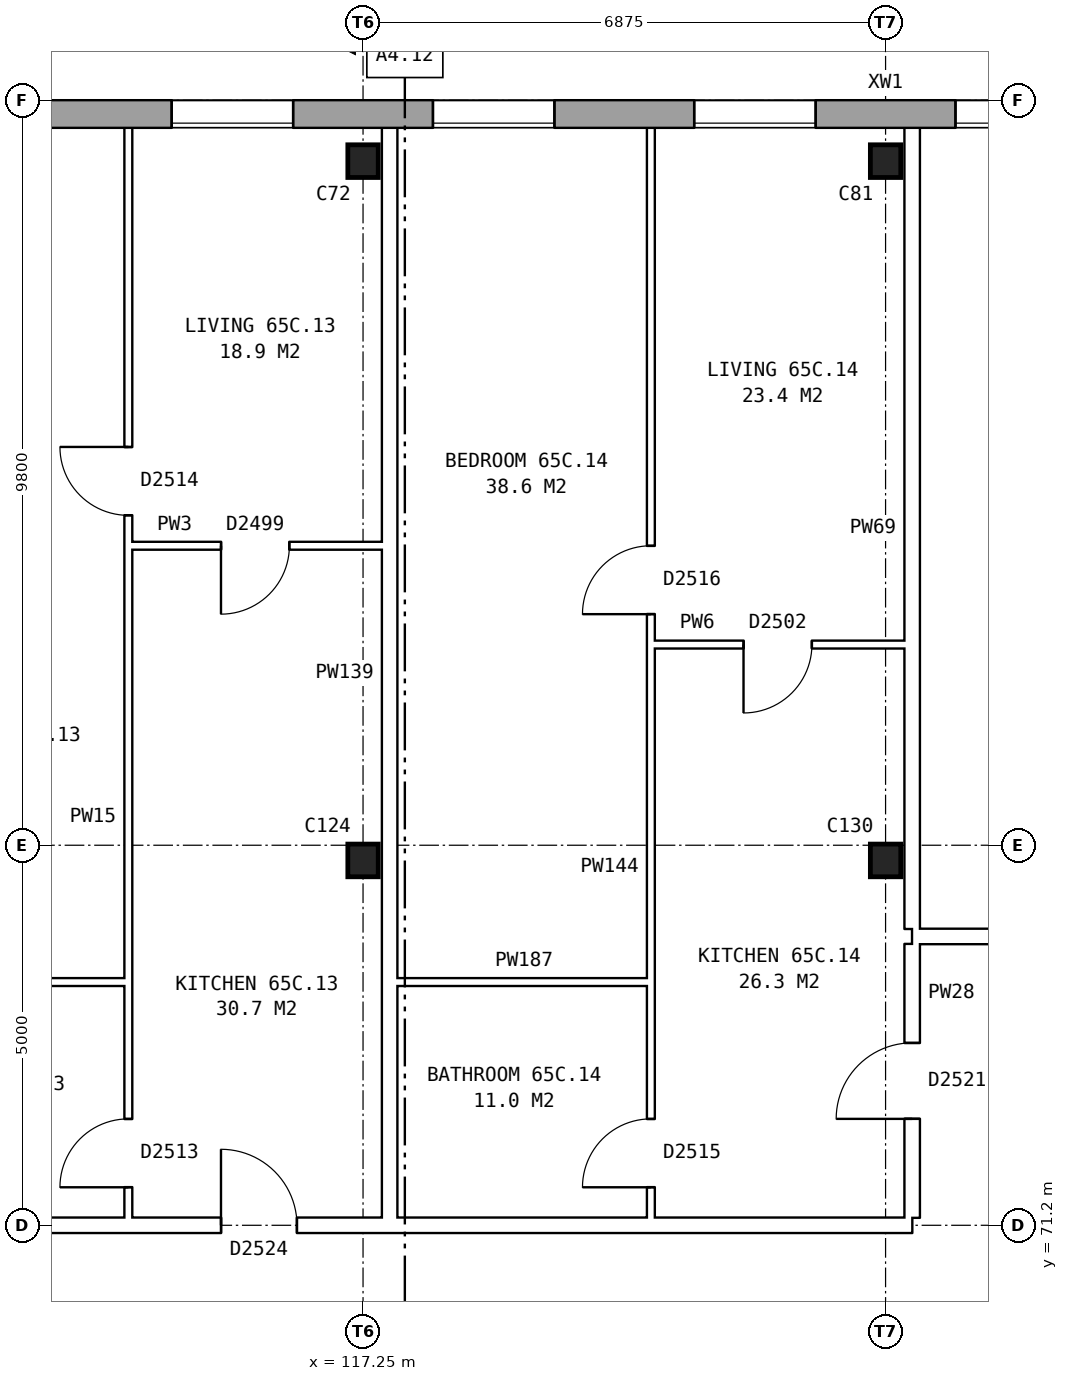
"""IFC4 building model, lengths in metres.
Left out: names, types, materials, properties, quantities, classifications, styles, units other than length and angle.
Written with IfcOpenShell. Run it as: python <this file> out.ifc"""

import sys

from ifc_helpers import new_model, si_unit, direction, frame, frame_2d, origin, origin_2d, place, context, subcontext, project, spatial, rectangle, i_section, extrude, element, fill, save


model = new_model("IFC4")
c1 = context("Model", 3, precision=1e-05, world=origin(), true_north=direction((0.0, 1.0)))
c2 = subcontext(c1, "Body", "Model", "MODEL_VIEW")
j1 = project(units=[si_unit("LENGTHUNIT", "METRE"), si_unit("PLANEANGLEUNIT", "RADIAN")], contexts=[c1])
p1 = place(None, origin())
s1 = spatial("IfcSite", under=j1, at=p1, CompositionType="ELEMENT")
p2 = place(p1, origin())
s2 = spatial("IfcBuilding", under=s1, at=p2, CompositionType="ELEMENT")
p3 = place(p2, frame((0.0, 0.0, 230.7)))
s3 = spatial("IfcBuildingStorey", under=s2, at=p3, CompositionType="ELEMENT", Elevation=230.7)
for number, where, z_axis, x_axis in (
    (1, (117.25, 76.0, 0.0), (0.0, 0.0, 1.0), (1.0, 0.0, 0.0)),
    (2, (124.125, 76.0, 0.0), (0.0, 0.0, 1.0), (1.0, 0.0, 0.0)),
    (3, (117.25, 85.2, 0.0), (0.0, 0.0, 1.0), (1.0, 0.0, 0.0)),
    (4, (124.125, 85.2, 0.0), (0.0, 0.0, 1.0), (1.0, 0.0, 0.0)),
):
    element("IfcColumn", number, at=place(p3, frame(where, z_axis=z_axis, x_axis=x_axis)), inside=s3, PredefinedType="COLUMN", context=c2, shape_type="SweptSolid", body=[
        extrude(i_section(OverallWidth=0.4, OverallDepth=0.43, WebThickness=0.028, FlangeThickness=0.04, at=origin_2d()), origin(), (0.0, 0.0, 1.0), 2.85),
    ])
p4 = place(p3, frame((131.05, 85.82, 0.0), z_axis=(0.0, 0.0, 1.0), x_axis=(-1.0, 0.0, 0.0)))
e5 = element("IfcWall", 5, at=p4, inside=s3, PredefinedType="STANDARD", context=c2, shape_type="SweptSolid", body=[
    extrude(rectangle(XDim=55.1, YDim=0.36, at=frame_2d((27.55, 0.0))), origin(), (0.0, 0.0, 1.0), 2.85),
])
p5 = place(p4, frame((0.969, 0.0, 0.8)))
e6 = element("IfcOpeningElement", 6, at=p5, cuts=e5, PredefinedType="OPENING", context=c2, shape_type="SweptSolid", body=[
    extrude(rectangle(XDim=1.6, YDim=1.8, at=frame_2d((0.8, 0.9))), frame((0.0, 0.19, 0.0), z_axis=(0.0, -1.0, 0.0), x_axis=(1.0, 0.0, 0.0)), (0.0, 0.0, 1.0), 0.38),
])
p6 = place(p4, frame((4.406, 0.0, 0.8)))
e7 = element("IfcOpeningElement", 7, at=p6, cuts=e5, PredefinedType="OPENING", context=c2, shape_type="SweptSolid", body=[
    extrude(rectangle(XDim=1.6, YDim=1.8, at=frame_2d((0.8, 0.9))), frame((0.0, 0.19, 0.0), z_axis=(0.0, -1.0, 0.0), x_axis=(1.0, 0.0, 0.0)), (0.0, 0.0, 1.0), 0.38),
])
p7 = place(p4, frame((7.844, 0.0, 0.8)))
e8 = element("IfcOpeningElement", 8, at=p7, cuts=e5, PredefinedType="OPENING", context=c2, shape_type="SweptSolid", body=[
    extrude(rectangle(XDim=1.6, YDim=1.8, at=frame_2d((0.8, 0.9))), frame((0.0, 0.19, 0.0), z_axis=(0.0, -1.0, 0.0), x_axis=(1.0, 0.0, 0.0)), (0.0, 0.0, 1.0), 0.38),
])
p8 = place(p4, frame((11.281, 0.0, 0.8)))
e9 = element("IfcOpeningElement", 9, at=p8, cuts=e5, PredefinedType="OPENING", context=c2, shape_type="SweptSolid", body=[
    extrude(rectangle(XDim=1.6, YDim=1.8, at=frame_2d((0.8, 0.9))), frame((0.0, 0.19, 0.0), z_axis=(0.0, -1.0, 0.0), x_axis=(1.0, 0.0, 0.0)), (0.0, 0.0, 1.0), 0.38),
])
p9 = place(p4, frame((14.719, 0.0, 0.8)))
e10 = element("IfcOpeningElement", 10, at=p9, cuts=e5, PredefinedType="OPENING", context=c2, shape_type="SweptSolid", body=[
    extrude(rectangle(XDim=1.6, YDim=1.8, at=frame_2d((0.8, 0.9))), frame((0.0, 0.19, 0.0), z_axis=(0.0, -1.0, 0.0), x_axis=(1.0, 0.0, 0.0)), (0.0, 0.0, 1.0), 0.38),
])
p10 = place(p4, frame((18.156, 0.0, 0.8)))
e11 = element("IfcOpeningElement", 11, at=p10, cuts=e5, PredefinedType="OPENING", context=c2, shape_type="SweptSolid", body=[
    extrude(rectangle(XDim=1.6, YDim=1.8, at=frame_2d((0.8, 0.9))), frame((0.0, 0.19, 0.0), z_axis=(0.0, -1.0, 0.0), x_axis=(1.0, 0.0, 0.0)), (0.0, 0.0, 1.0), 0.38),
])
p11 = place(p4, frame((21.594, 0.0, 0.8)))
e12 = element("IfcOpeningElement", 12, at=p11, cuts=e5, PredefinedType="OPENING", context=c2, shape_type="SweptSolid", body=[
    extrude(rectangle(XDim=1.6, YDim=1.8, at=frame_2d((0.8, 0.9))), frame((0.0, 0.19, 0.0), z_axis=(0.0, -1.0, 0.0), x_axis=(1.0, 0.0, 0.0)), (0.0, 0.0, 1.0), 0.38),
])
p12 = place(p4, frame((25.031, 0.0, 0.8)))
e13 = element("IfcOpeningElement", 13, at=p12, cuts=e5, PredefinedType="OPENING", context=c2, shape_type="SweptSolid", body=[
    extrude(rectangle(XDim=1.6, YDim=1.8, at=frame_2d((0.8, 0.9))), frame((0.0, 0.19, 0.0), z_axis=(0.0, -1.0, 0.0), x_axis=(1.0, 0.0, 0.0)), (0.0, 0.0, 1.0), 0.38),
])
p13 = place(p4, frame((28.469, 0.0, 0.8)))
e14 = element("IfcOpeningElement", 14, at=p13, cuts=e5, PredefinedType="OPENING", context=c2, shape_type="SweptSolid", body=[
    extrude(rectangle(XDim=1.6, YDim=1.8, at=frame_2d((0.8, 0.9))), frame((0.0, 0.19, 0.0), z_axis=(0.0, -1.0, 0.0), x_axis=(1.0, 0.0, 0.0)), (0.0, 0.0, 1.0), 0.38),
])
p14 = place(p4, frame((31.906, 0.0, 0.8)))
e15 = element("IfcOpeningElement", 15, at=p14, cuts=e5, PredefinedType="OPENING", context=c2, shape_type="SweptSolid", body=[
    extrude(rectangle(XDim=1.6, YDim=1.8, at=frame_2d((0.8, 0.9))), frame((0.0, 0.19, 0.0), z_axis=(0.0, -1.0, 0.0), x_axis=(1.0, 0.0, 0.0)), (0.0, 0.0, 1.0), 0.38),
])
p15 = place(p4, frame((35.344, 0.0, 0.8)))
e16 = element("IfcOpeningElement", 16, at=p15, cuts=e5, PredefinedType="OPENING", context=c2, shape_type="SweptSolid", body=[
    extrude(rectangle(XDim=1.6, YDim=1.8, at=frame_2d((0.8, 0.9))), frame((0.0, 0.19, 0.0), z_axis=(0.0, -1.0, 0.0), x_axis=(1.0, 0.0, 0.0)), (0.0, 0.0, 1.0), 0.38),
])
p16 = place(p4, frame((38.781, 0.0, 0.8)))
e17 = element("IfcOpeningElement", 17, at=p16, cuts=e5, PredefinedType="OPENING", context=c2, shape_type="SweptSolid", body=[
    extrude(rectangle(XDim=1.6, YDim=1.8, at=frame_2d((0.8, 0.9))), frame((0.0, 0.19, 0.0), z_axis=(0.0, -1.0, 0.0), x_axis=(1.0, 0.0, 0.0)), (0.0, 0.0, 1.0), 0.38),
])
p17 = place(p4, frame((42.219, 0.0, 0.8)))
e18 = element("IfcOpeningElement", 18, at=p17, cuts=e5, PredefinedType="OPENING", context=c2, shape_type="SweptSolid", body=[
    extrude(rectangle(XDim=1.6, YDim=1.8, at=frame_2d((0.8, 0.9))), frame((0.0, 0.19, 0.0), z_axis=(0.0, -1.0, 0.0), x_axis=(1.0, 0.0, 0.0)), (0.0, 0.0, 1.0), 0.38),
])
p18 = place(p4, frame((45.656, 0.0, 0.8)))
e19 = element("IfcOpeningElement", 19, at=p18, cuts=e5, PredefinedType="OPENING", context=c2, shape_type="SweptSolid", body=[
    extrude(rectangle(XDim=1.6, YDim=1.8, at=frame_2d((0.8, 0.9))), frame((0.0, 0.19, 0.0), z_axis=(0.0, -1.0, 0.0), x_axis=(1.0, 0.0, 0.0)), (0.0, 0.0, 1.0), 0.38),
])
p19 = place(p4, frame((49.094, 0.0, 0.8)))
e20 = element("IfcOpeningElement", 20, at=p19, cuts=e5, PredefinedType="OPENING", context=c2, shape_type="SweptSolid", body=[
    extrude(rectangle(XDim=1.6, YDim=1.8, at=frame_2d((0.8, 0.9))), frame((0.0, 0.19, 0.0), z_axis=(0.0, -1.0, 0.0), x_axis=(1.0, 0.0, 0.0)), (0.0, 0.0, 1.0), 0.38),
])
p20 = place(p4, frame((52.531, 0.0, 0.8)))
e21 = element("IfcOpeningElement", 21, at=p20, cuts=e5, PredefinedType="OPENING", context=c2, shape_type="SweptSolid", body=[
    extrude(rectangle(XDim=1.6, YDim=1.8, at=frame_2d((0.8, 0.9))), frame((0.0, 0.19, 0.0), z_axis=(0.0, -1.0, 0.0), x_axis=(1.0, 0.0, 0.0)), (0.0, 0.0, 1.0), 0.38),
])
p21 = place(p3, frame((83.225, 71.2, 0.0), z_axis=(0.0, 0.0, 1.0), x_axis=(1.0, 0.0, 0.0)))
e22 = element("IfcWall", 22, at=p21, inside=s3, PredefinedType="PARTITIONING", context=c2, shape_type="SweptSolid", body=[
    extrude(rectangle(XDim=41.25, YDim=0.2, at=frame_2d((20.625, 0.0))), origin(), (0.0, 0.0, 1.0), 2.85),
])
p22 = place(p21, frame((11.531, 0.0, 0.0)))
e23 = element("IfcOpeningElement", 23, at=p22, cuts=e22, PredefinedType="OPENING", context=c2, shape_type="SweptSolid", body=[
    extrude(rectangle(XDim=1.0, YDim=2.1, at=frame_2d((0.5, 1.05))), frame((0.0, 0.11, 0.0), z_axis=(0.0, -1.0, 0.0), x_axis=(1.0, 0.0, 0.0)), (0.0, 0.0, 1.0), 0.22),
])
p23 = place(p21, frame((21.844, 0.0, 0.0)))
e24 = element("IfcOpeningElement", 24, at=p23, cuts=e22, PredefinedType="OPENING", context=c2, shape_type="SweptSolid", body=[
    extrude(rectangle(XDim=1.0, YDim=2.1, at=frame_2d((0.5, 1.05))), frame((0.0, 0.11, 0.0), z_axis=(0.0, -1.0, 0.0), x_axis=(1.0, 0.0, 0.0)), (0.0, 0.0, 1.0), 0.22),
])
p24 = place(p21, frame((32.156, 0.0, 0.0)))
e25 = element("IfcOpeningElement", 25, at=p24, cuts=e22, PredefinedType="OPENING", context=c2, shape_type="SweptSolid", body=[
    extrude(rectangle(XDim=1.0, YDim=2.1, at=frame_2d((0.5, 1.05))), frame((0.0, 0.11, 0.0), z_axis=(0.0, -1.0, 0.0), x_axis=(1.0, 0.0, 0.0)), (0.0, 0.0, 1.0), 0.22),
])
p25 = place(p3, frame((107.287, 74.4, 0.0), z_axis=(0.0, 0.0, 1.0), x_axis=(1.0, 0.0, 0.0)))
e26 = element("IfcWall", 26, at=p25, inside=s3, PredefinedType="PARTITIONING", context=c2, shape_type="SweptSolid", body=[
    extrude(rectangle(XDim=6.875, YDim=0.1, at=frame_2d((3.438, 0.0))), origin(), (0.0, 0.0, 1.0), 2.85),
])
p26 = place(p3, frame((117.7, 74.4, 0.0), z_axis=(0.0, 0.0, 1.0), x_axis=(1.0, 0.0, 0.0)))
e27 = element("IfcWall", 27, at=p26, inside=s3, PredefinedType="PARTITIONING", context=c2, shape_type="SweptSolid", body=[
    extrude(rectangle(XDim=3.337, YDim=0.1, at=frame_2d((1.668, 0.0))), origin(), (0.0, 0.0, 1.0), 2.85),
])
p27 = place(p3, frame((124.475, 75.0, 0.0), z_axis=(0.0, 0.0, 1.0), x_axis=(1.0, 0.0, 0.0)))
e28 = element("IfcWall", 28, at=p27, inside=s3, PredefinedType="PARTITIONING", context=c2, shape_type="SweptSolid", body=[
    extrude(rectangle(XDim=6.885, YDim=0.2, at=frame_2d((3.442, 0.0))), origin(), (0.0, 0.0, 1.0), 2.85),
])
p28 = place(p27, frame((2.992, 0.0, 0.0)))
e29 = element("IfcOpeningElement", 29, at=p28, cuts=e28, PredefinedType="OPENING", context=c2, shape_type="SweptSolid", body=[
    extrude(rectangle(XDim=0.9, YDim=2.1, at=frame_2d((0.45, 1.05))), frame((0.0, 0.11, 0.0), z_axis=(0.0, -1.0, 0.0), x_axis=(1.0, 0.0, 0.0)), (0.0, 0.0, 1.0), 0.22),
])
p29 = place(p3, frame((121.037, 78.84, 0.0), z_axis=(0.0, 0.0, 1.0), x_axis=(1.0, 0.0, 0.0)))
e30 = element("IfcWall", 30, at=p29, inside=s3, PredefinedType="PARTITIONING", context=c2, shape_type="SweptSolid", body=[
    extrude(rectangle(XDim=3.338, YDim=0.1, at=frame_2d((1.669, 0.0))), origin(), (0.0, 0.0, 1.0), 2.85),
])
p30 = place(p29, frame((1.219, 0.0, 0.0)))
e31 = element("IfcOpeningElement", 31, at=p30, cuts=e30, PredefinedType="OPENING", context=c2, shape_type="SweptSolid", body=[
    extrude(rectangle(XDim=0.9, YDim=2.1, at=frame_2d((0.45, 1.05))), frame((0.0, 0.06, 0.0), z_axis=(0.0, -1.0, 0.0), x_axis=(1.0, 0.0, 0.0)), (0.0, 0.0, 1.0), 0.12),
])
p31 = place(p3, frame((114.162, 80.14, 0.0), z_axis=(0.0, 0.0, 1.0), x_axis=(1.0, 0.0, 0.0)))
e32 = element("IfcWall", 32, at=p31, inside=s3, PredefinedType="PARTITIONING", context=c2, shape_type="SweptSolid", body=[
    extrude(rectangle(XDim=3.338, YDim=0.1, at=frame_2d((1.669, 0.0))), origin(), (0.0, 0.0, 1.0), 2.85),
])
p32 = place(p31, frame((1.219, 0.0, 0.0)))
e33 = element("IfcOpeningElement", 33, at=p32, cuts=e32, PredefinedType="OPENING", context=c2, shape_type="SweptSolid", body=[
    extrude(rectangle(XDim=0.9, YDim=2.1, at=frame_2d((0.45, 1.05))), frame((0.0, 0.06, 0.0), z_axis=(0.0, -1.0, 0.0), x_axis=(1.0, 0.0, 0.0)), (0.0, 0.0, 1.0), 0.12),
])
p33 = place(p3, frame((114.162, 71.3, 0.0), z_axis=(0.0, 0.0, 1.0), x_axis=(0.0, 1.0, 0.0)))
e34 = element("IfcWall", 34, at=p33, inside=s3, PredefinedType="PARTITIONING", context=c2, shape_type="SweptSolid", body=[
    extrude(rectangle(XDim=14.34, YDim=0.1, at=frame_2d((7.17, 0.0))), origin(), (0.0, 0.0, 1.0), 2.85),
])
p34 = place(p33, frame((9.24, 0.0, 0.0)))
e35 = element("IfcOpeningElement", 35, at=p34, cuts=e34, PredefinedType="OPENING", context=c2, shape_type="SweptSolid", body=[
    extrude(rectangle(XDim=0.9, YDim=2.1, at=frame_2d((0.45, 1.05))), frame((0.0, 0.06, 0.0), z_axis=(0.0, -1.0, 0.0), x_axis=(1.0, 0.0, 0.0)), (0.0, 0.0, 1.0), 0.12),
])
p35 = place(p33, frame((0.4, 0.0, 0.0)))
e36 = element("IfcOpeningElement", 36, at=p35, cuts=e34, PredefinedType="OPENING", context=c2, shape_type="SweptSolid", body=[
    extrude(rectangle(XDim=0.9, YDim=2.1, at=frame_2d((0.45, 1.05))), frame((0.0, 0.06, 0.0), z_axis=(0.0, -1.0, 0.0), x_axis=(1.0, 0.0, 0.0)), (0.0, 0.0, 1.0), 0.12),
])
p36 = place(p3, frame((117.6, 71.3, 0.0), z_axis=(0.0, 0.0, 1.0), x_axis=(0.0, 1.0, 0.0)))
e37 = element("IfcWall", 37, at=p36, inside=s3, PredefinedType="PARTITIONING", context=c2, shape_type="SweptSolid", body=[
    extrude(rectangle(XDim=14.34, YDim=0.2, at=frame_2d((7.17, 0.0))), origin(), (0.0, 0.0, 1.0), 2.85),
])
p37 = place(p3, frame((121.037, 71.3, 0.0), z_axis=(0.0, 0.0, 1.0), x_axis=(0.0, 1.0, 0.0)))
e38 = element("IfcWall", 38, at=p37, inside=s3, PredefinedType="PARTITIONING", context=c2, shape_type="SweptSolid", body=[
    extrude(rectangle(XDim=14.34, YDim=0.1, at=frame_2d((7.17, 0.0))), origin(), (0.0, 0.0, 1.0), 2.85),
])
p38 = place(p37, frame((7.94, 0.0, 0.0)))
e39 = element("IfcOpeningElement", 39, at=p38, cuts=e38, PredefinedType="OPENING", context=c2, shape_type="SweptSolid", body=[
    extrude(rectangle(XDim=0.9, YDim=2.1, at=frame_2d((0.45, 1.05))), frame((0.0, 0.06, 0.0), z_axis=(0.0, -1.0, 0.0), x_axis=(1.0, 0.0, 0.0)), (0.0, 0.0, 1.0), 0.12),
])
p39 = place(p37, frame((0.4, 0.0, 0.0)))
e40 = element("IfcOpeningElement", 40, at=p39, cuts=e38, PredefinedType="OPENING", context=c2, shape_type="SweptSolid", body=[
    extrude(rectangle(XDim=0.9, YDim=2.1, at=frame_2d((0.45, 1.05))), frame((0.0, 0.06, 0.0), z_axis=(0.0, -1.0, 0.0), x_axis=(1.0, 0.0, 0.0)), (0.0, 0.0, 1.0), 0.12),
])
p40 = place(p3, frame((124.475, 71.3, 0.0), z_axis=(0.0, 0.0, 1.0), x_axis=(0.0, 1.0, 0.0)))
e41 = element("IfcWall", 41, at=p40, inside=s3, PredefinedType="PARTITIONING", context=c2, shape_type="SweptSolid", body=[
    extrude(rectangle(XDim=3.6, YDim=0.2, at=frame_2d((1.8, 0.0))), origin(), (0.0, 0.0, 1.0), 2.85),
])
p41 = place(p40, frame((1.3, 0.0, 0.0)))
e42 = element("IfcOpeningElement", 42, at=p41, cuts=e41, PredefinedType="OPENING", context=c2, shape_type="SweptSolid", body=[
    extrude(rectangle(XDim=1.0, YDim=2.1, at=frame_2d((0.5, 1.05))), frame((0.0, 0.11, 0.0), z_axis=(0.0, -1.0, 0.0), x_axis=(1.0, 0.0, 0.0)), (0.0, 0.0, 1.0), 0.22),
])
p42 = place(p3, frame((124.475, 75.1, 0.0), z_axis=(0.0, 0.0, 1.0), x_axis=(0.0, 1.0, 0.0)))
e43 = element("IfcWall", 43, at=p42, inside=s3, PredefinedType="PARTITIONING", context=c2, shape_type="SweptSolid", body=[
    extrude(rectangle(XDim=10.54, YDim=0.2, at=frame_2d((5.27, 0.0))), origin(), (0.0, 0.0, 1.0), 2.85),
])
p43 = place(p6, origin())
e44 = element("IfcWindow", 44, at=p43, inside=s3, PartitioningType="SINGLE_PANEL", PredefinedType="WINDOW", context=c2, shape_type="SweptSolid", body=[
    extrude(rectangle(XDim=1.6, YDim=1.8, at=frame_2d((0.8, 0.9))), frame((0.0, 0.15, 0.0), z_axis=(0.0, -1.0, 0.0), x_axis=(1.0, 0.0, 0.0)), (0.0, 0.0, 1.0), 0.06),
])
fill(e7, e44)
p44 = place(p7, origin())
e45 = element("IfcWindow", 45, at=p44, inside=s3, PartitioningType="SINGLE_PANEL", PredefinedType="WINDOW", context=c2, shape_type="SweptSolid", body=[
    extrude(rectangle(XDim=1.6, YDim=1.8, at=frame_2d((0.8, 0.9))), frame((0.0, 0.15, 0.0), z_axis=(0.0, -1.0, 0.0), x_axis=(1.0, 0.0, 0.0)), (0.0, 0.0, 1.0), 0.06),
])
fill(e8, e45)
p45 = place(p8, origin())
e46 = element("IfcWindow", 46, at=p45, inside=s3, PartitioningType="SINGLE_PANEL", PredefinedType="WINDOW", context=c2, shape_type="SweptSolid", body=[
    extrude(rectangle(XDim=1.6, YDim=1.8, at=frame_2d((0.8, 0.9))), frame((0.0, 0.15, 0.0), z_axis=(0.0, -1.0, 0.0), x_axis=(1.0, 0.0, 0.0)), (0.0, 0.0, 1.0), 0.06),
])
fill(e9, e46)
p46 = place(p9, origin())
e47 = element("IfcWindow", 47, at=p46, inside=s3, PartitioningType="SINGLE_PANEL", PredefinedType="WINDOW", context=c2, shape_type="SweptSolid", body=[
    extrude(rectangle(XDim=1.6, YDim=1.8, at=frame_2d((0.8, 0.9))), frame((0.0, 0.15, 0.0), z_axis=(0.0, -1.0, 0.0), x_axis=(1.0, 0.0, 0.0)), (0.0, 0.0, 1.0), 0.06),
])
fill(e10, e47)
p47 = place(p34, origin())
e48 = element("IfcDoor", 48, at=p47, inside=s3, OperationType="SINGLE_SWING_RIGHT", PredefinedType="DOOR", context=c2, shape_type="SweptSolid", body=[
    extrude(rectangle(XDim=0.9, YDim=2.1, at=frame_2d((0.45, 1.05))), frame((0.0, 0.025, 0.0), z_axis=(0.0, -1.0, 0.0), x_axis=(1.0, 0.0, 0.0)), (0.0, 0.0, 1.0), 0.05),
])
fill(e35, e48)
p48 = place(p24, origin())
e49 = element("IfcDoor", 49, at=p48, inside=s3, OperationType="SINGLE_SWING_LEFT", PredefinedType="DOOR", context=c2, shape_type="SweptSolid", body=[
    extrude(rectangle(XDim=1.0, YDim=2.1, at=frame_2d((0.5, 1.05))), frame((0.0, 0.025, 0.0), z_axis=(0.0, -1.0, 0.0), x_axis=(1.0, 0.0, 0.0)), (0.0, 0.0, 1.0), 0.05),
])
fill(e25, e49)
p49 = place(p32, frame((0.9, 0.0, 0.0), z_axis=(0.0, 0.0, 1.0), x_axis=(-1.0, 0.0, 0.0)))
e50 = element("IfcDoor", 50, at=p49, inside=s3, OperationType="SINGLE_SWING_RIGHT", PredefinedType="DOOR", context=c2, shape_type="SweptSolid", body=[
    extrude(rectangle(XDim=0.9, YDim=2.1, at=frame_2d((0.45, 1.05))), frame((0.0, 0.025, 0.0), z_axis=(0.0, -1.0, 0.0), x_axis=(1.0, 0.0, 0.0)), (0.0, 0.0, 1.0), 0.05),
])
fill(e33, e50)
p50 = place(p35, origin())
e51 = element("IfcDoor", 51, at=p50, inside=s3, OperationType="SINGLE_SWING_LEFT", PredefinedType="DOOR", context=c2, shape_type="SweptSolid", body=[
    extrude(rectangle(XDim=0.9, YDim=2.1, at=frame_2d((0.45, 1.05))), frame((0.0, 0.025, 0.0), z_axis=(0.0, -1.0, 0.0), x_axis=(1.0, 0.0, 0.0)), (0.0, 0.0, 1.0), 0.05),
])
fill(e36, e51)
p51 = place(p38, origin())
e52 = element("IfcDoor", 52, at=p51, inside=s3, OperationType="SINGLE_SWING_LEFT", PredefinedType="DOOR", context=c2, shape_type="SweptSolid", body=[
    extrude(rectangle(XDim=0.9, YDim=2.1, at=frame_2d((0.45, 1.05))), frame((0.0, 0.025, 0.0), z_axis=(0.0, -1.0, 0.0), x_axis=(1.0, 0.0, 0.0)), (0.0, 0.0, 1.0), 0.05),
])
fill(e39, e52)
p52 = place(p41, origin())
e53 = element("IfcDoor", 53, at=p52, inside=s3, OperationType="SINGLE_SWING_LEFT", PredefinedType="DOOR", context=c2, shape_type="SweptSolid", body=[
    extrude(rectangle(XDim=1.0, YDim=2.1, at=frame_2d((0.5, 1.05))), frame((0.0, 0.025, 0.0), z_axis=(0.0, -1.0, 0.0), x_axis=(1.0, 0.0, 0.0)), (0.0, 0.0, 1.0), 0.05),
])
fill(e42, e53)
p53 = place(p30, frame((0.9, 0.0, 0.0), z_axis=(0.0, 0.0, 1.0), x_axis=(-1.0, 0.0, 0.0)))
e54 = element("IfcDoor", 54, at=p53, inside=s3, OperationType="SINGLE_SWING_RIGHT", PredefinedType="DOOR", context=c2, shape_type="SweptSolid", body=[
    extrude(rectangle(XDim=0.9, YDim=2.1, at=frame_2d((0.45, 1.05))), frame((0.0, 0.025, 0.0), z_axis=(0.0, -1.0, 0.0), x_axis=(1.0, 0.0, 0.0)), (0.0, 0.0, 1.0), 0.05),
])
fill(e31, e54)
p54 = place(p39, origin())
e55 = element("IfcDoor", 55, at=p54, inside=s3, OperationType="SINGLE_SWING_LEFT", PredefinedType="DOOR", context=c2, shape_type="SweptSolid", body=[
    extrude(rectangle(XDim=0.9, YDim=2.1, at=frame_2d((0.45, 1.05))), frame((0.0, 0.025, 0.0), z_axis=(0.0, -1.0, 0.0), x_axis=(1.0, 0.0, 0.0)), (0.0, 0.0, 1.0), 0.05),
])
fill(e40, e55)
save(model, sys.argv[1])
